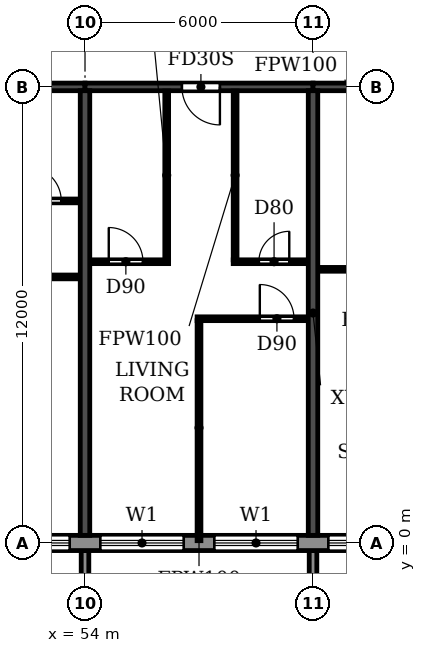
"""IFC4 building model, lengths in metres.
Left out: names, types, materials, properties, quantities, classifications, styles, units other than length and angle.
Written with IfcOpenShell. Run it as: python <this file> out.ifc"""

import sys

from ifc_helpers import new_model, si_unit, direction, frame, frame_2d, origin, place, context, subcontext, project, spatial, polyline, rectangle, outline, extrude, source, transform, mapped, element, fill, save


model = new_model("IFC4")
c1 = context("Model", 3, precision=1e-05, world=origin(), true_north=direction((0.0, 1.0)))
c2 = subcontext(c1, "Body", "Model", "MODEL_VIEW")
j1 = project(units=[si_unit("LENGTHUNIT", "METRE"), si_unit("PLANEANGLEUNIT", "RADIAN")], contexts=[c1])
p1 = place(None, origin())
s1 = spatial("IfcSite", under=j1, at=p1, CompositionType="ELEMENT")
p2 = place(p1, origin())
s2 = spatial("IfcBuilding", under=s1, at=p2, CompositionType="ELEMENT")
p3 = place(p2, frame((0.0, 0.0, 231.3)))
s3 = spatial("IfcBuildingStorey", under=s2, at=p3, CompositionType="ELEMENT", Elevation=231.3)
for number, where, z_axis, x_axis in (
    (1, (54.0, 0.2, 0.0), (0.0, 0.0, 1.0), (0.0, 1.0, 0.0)),
    (2, (60.0, 0.2, 0.0), (0.0, 0.0, 1.0), (0.0, 1.0, 0.0)),
):
    element("IfcWall", number, at=place(p3, frame(where, z_axis=z_axis, x_axis=x_axis)), inside=s3, PredefinedType="SHEAR", context=c2, shape_type="SweptSolid", body=[
        extrude(rectangle(XDim=11.7, YDim=0.25, at=frame_2d((5.85, 0.0))), origin(), (0.0, 0.0, 1.0), 3.08),
    ])
p4 = place(p3, frame((48.0, 12.0, 0.0), z_axis=(0.0, 0.0, 1.0), x_axis=(1.0, 0.0, 0.0)))
e3 = element("IfcWall", 3, at=p4, inside=s3, PredefinedType="SHEAR", context=c2, shape_type="SweptSolid", body=[
    extrude(rectangle(XDim=6.0, YDim=0.2, at=frame_2d((3.0, 0.0))), origin(), (0.0, 0.0, 1.0), 2.48),
])
p5 = place(p4, frame((2.45, 0.0, 0.0)))
e4 = element("IfcOpeningElement", 4, at=p5, cuts=e3, PredefinedType="OPENING", context=c2, shape_type="SweptSolid", body=[
    extrude(rectangle(XDim=1.0, YDim=2.1, at=frame_2d((0.5, 1.05))), frame((0.0, 0.11, 0.0), z_axis=(0.0, -1.0, 0.0), x_axis=(1.0, 0.0, 0.0)), (0.0, 0.0, 1.0), 0.22),
])
p6 = place(p3, frame((54.0, 12.0, 0.0), z_axis=(0.0, 0.0, 1.0), x_axis=(1.0, 0.0, 0.0)))
e5 = element("IfcWall", 5, at=p6, inside=s3, PredefinedType="SHEAR", context=c2, shape_type="SweptSolid", body=[
    extrude(rectangle(XDim=6.0, YDim=0.2, at=frame_2d((3.0, 0.0))), origin(), (0.0, 0.0, 1.0), 2.48),
])
p7 = place(p6, frame((2.55, 0.0, 0.0)))
e6 = element("IfcOpeningElement", 6, at=p7, cuts=e5, PredefinedType="OPENING", context=c2, shape_type="SweptSolid", body=[
    extrude(rectangle(XDim=1.0, YDim=2.1, at=frame_2d((0.5, 1.05))), frame((0.0, 0.11, 0.0), z_axis=(0.0, -1.0, 0.0), x_axis=(1.0, 0.0, 0.0)), (0.0, 0.0, 1.0), 0.22),
])
p8 = place(p3, frame((60.0, 12.0, 0.0), z_axis=(0.0, 0.0, 1.0), x_axis=(1.0, 0.0, 0.0)))
e7 = element("IfcWall", 7, at=p8, inside=s3, PredefinedType="SHEAR", context=c2, shape_type="SweptSolid", body=[
    extrude(rectangle(XDim=6.0, YDim=0.2, at=frame_2d((3.0, 0.0))), origin(), (0.0, 0.0, 1.0), 2.48),
])
p9 = place(p8, frame((2.45, 0.0, 0.0)))
e8 = element("IfcOpeningElement", 8, at=p9, cuts=e7, PredefinedType="OPENING", context=c2, shape_type="SweptSolid", body=[
    extrude(rectangle(XDim=1.0, YDim=2.1, at=frame_2d((0.5, 1.05))), frame((0.0, 0.11, 0.0), z_axis=(0.0, -1.0, 0.0), x_axis=(1.0, 0.0, 0.0)), (0.0, 0.0, 1.0), 0.22),
])
p10 = place(p3, frame((22.683, 0.0, 0.0), z_axis=(0.0, 0.0, 1.0), x_axis=(1.0, 0.0, 0.0)))
e9 = element("IfcWall", 9, at=p10, inside=s3, PredefinedType="STANDARD", context=c2, shape_type="SweptSolid", body=[
    extrude(rectangle(XDim=56.634, YDim=0.4, at=frame_2d((28.317, 0.0))), origin(), (0.0, 0.0, 1.0), 3.08),
])
p11 = place(p10, frame((1.917, 0.0, 0.0)))
e10 = element("IfcOpeningElement", 10, at=p11, cuts=e9, PredefinedType="OPENING", context=c2, shape_type="SweptSolid", body=[
    extrude(rectangle(XDim=1.8, YDim=2.4, at=frame_2d((0.9, 1.2))), frame((0.0, 0.21, 0.0), z_axis=(0.0, -1.0, 0.0), x_axis=(1.0, 0.0, 0.0)), (0.0, 0.0, 1.0), 0.42),
])
p12 = place(p10, frame((4.717, 0.0, 0.9)))
e11 = element("IfcOpeningElement", 11, at=p12, cuts=e9, PredefinedType="OPENING", context=c2, shape_type="SweptSolid", body=[
    extrude(rectangle(XDim=2.2, YDim=1.5, at=frame_2d((1.1, 0.75))), frame((0.0, 0.21, 0.0), z_axis=(0.0, -1.0, 0.0), x_axis=(1.0, 0.0, 0.0)), (0.0, 0.0, 1.0), 0.42),
])
p13 = place(p10, frame((7.717, 0.0, 0.9)))
e12 = element("IfcOpeningElement", 12, at=p13, cuts=e9, PredefinedType="OPENING", context=c2, shape_type="SweptSolid", body=[
    extrude(rectangle(XDim=2.2, YDim=1.5, at=frame_2d((1.1, 0.75))), frame((0.0, 0.21, 0.0), z_axis=(0.0, -1.0, 0.0), x_axis=(1.0, 0.0, 0.0)), (0.0, 0.0, 1.0), 0.42),
])
p14 = place(p10, frame((10.717, 0.0, 0.9)))
e13 = element("IfcOpeningElement", 13, at=p14, cuts=e9, PredefinedType="OPENING", context=c2, shape_type="SweptSolid", body=[
    extrude(rectangle(XDim=2.2, YDim=1.5, at=frame_2d((1.1, 0.75))), frame((0.0, 0.21, 0.0), z_axis=(0.0, -1.0, 0.0), x_axis=(1.0, 0.0, 0.0)), (0.0, 0.0, 1.0), 0.42),
])
p15 = place(p10, frame((13.717, 0.0, 0.9)))
e14 = element("IfcOpeningElement", 14, at=p15, cuts=e9, PredefinedType="OPENING", context=c2, shape_type="SweptSolid", body=[
    extrude(rectangle(XDim=2.2, YDim=1.5, at=frame_2d((1.1, 0.75))), frame((0.0, 0.21, 0.0), z_axis=(0.0, -1.0, 0.0), x_axis=(1.0, 0.0, 0.0)), (0.0, 0.0, 1.0), 0.42),
])
p16 = place(p10, frame((16.917, 0.0, 0.0)))
e15 = element("IfcOpeningElement", 15, at=p16, cuts=e9, PredefinedType="OPENING", context=c2, shape_type="SweptSolid", body=[
    extrude(rectangle(XDim=1.8, YDim=2.4, at=frame_2d((0.9, 1.2))), frame((0.0, 0.21, 0.0), z_axis=(0.0, -1.0, 0.0), x_axis=(1.0, 0.0, 0.0)), (0.0, 0.0, 1.0), 0.42),
])
p17 = place(p10, frame((19.717, 0.0, 0.9)))
e16 = element("IfcOpeningElement", 16, at=p17, cuts=e9, PredefinedType="OPENING", context=c2, shape_type="SweptSolid", body=[
    extrude(rectangle(XDim=2.2, YDim=1.5, at=frame_2d((1.1, 0.75))), frame((0.0, 0.21, 0.0), z_axis=(0.0, -1.0, 0.0), x_axis=(1.0, 0.0, 0.0)), (0.0, 0.0, 1.0), 0.42),
])
p18 = place(p10, frame((22.717, 0.0, 0.9)))
e17 = element("IfcOpeningElement", 17, at=p18, cuts=e9, PredefinedType="OPENING", context=c2, shape_type="SweptSolid", body=[
    extrude(rectangle(XDim=2.2, YDim=1.5, at=frame_2d((1.1, 0.75))), frame((0.0, 0.21, 0.0), z_axis=(0.0, -1.0, 0.0), x_axis=(1.0, 0.0, 0.0)), (0.0, 0.0, 1.0), 0.42),
])
p19 = place(p10, frame((25.917, 0.0, 0.0)))
e18 = element("IfcOpeningElement", 18, at=p19, cuts=e9, PredefinedType="OPENING", context=c2, shape_type="SweptSolid", body=[
    extrude(rectangle(XDim=1.8, YDim=2.4, at=frame_2d((0.9, 1.2))), frame((0.0, 0.21, 0.0), z_axis=(0.0, -1.0, 0.0), x_axis=(1.0, 0.0, 0.0)), (0.0, 0.0, 1.0), 0.42),
])
p20 = place(p10, frame((28.717, 0.0, 0.9)))
e19 = element("IfcOpeningElement", 19, at=p20, cuts=e9, PredefinedType="OPENING", context=c2, shape_type="SweptSolid", body=[
    extrude(rectangle(XDim=2.2, YDim=1.5, at=frame_2d((1.1, 0.75))), frame((0.0, 0.21, 0.0), z_axis=(0.0, -1.0, 0.0), x_axis=(1.0, 0.0, 0.0)), (0.0, 0.0, 1.0), 0.42),
])
p21 = place(p10, frame((31.717, 0.0, 0.9)))
e20 = element("IfcOpeningElement", 20, at=p21, cuts=e9, PredefinedType="OPENING", context=c2, shape_type="SweptSolid", body=[
    extrude(rectangle(XDim=2.2, YDim=1.5, at=frame_2d((1.1, 0.75))), frame((0.0, 0.21, 0.0), z_axis=(0.0, -1.0, 0.0), x_axis=(1.0, 0.0, 0.0)), (0.0, 0.0, 1.0), 0.42),
])
p22 = place(p10, frame((34.717, 0.0, 0.9)))
e21 = element("IfcOpeningElement", 21, at=p22, cuts=e9, PredefinedType="OPENING", context=c2, shape_type="SweptSolid", body=[
    extrude(rectangle(XDim=2.2, YDim=1.5, at=frame_2d((1.1, 0.75))), frame((0.0, 0.21, 0.0), z_axis=(0.0, -1.0, 0.0), x_axis=(1.0, 0.0, 0.0)), (0.0, 0.0, 1.0), 0.42),
])
p23 = place(p10, frame((37.717, 0.0, 0.9)))
e22 = element("IfcOpeningElement", 22, at=p23, cuts=e9, PredefinedType="OPENING", context=c2, shape_type="SweptSolid", body=[
    extrude(rectangle(XDim=2.2, YDim=1.5, at=frame_2d((1.1, 0.75))), frame((0.0, 0.21, 0.0), z_axis=(0.0, -1.0, 0.0), x_axis=(1.0, 0.0, 0.0)), (0.0, 0.0, 1.0), 0.42),
])
p24 = place(p10, frame((40.917, 0.0, 0.0)))
e23 = element("IfcOpeningElement", 23, at=p24, cuts=e9, PredefinedType="OPENING", context=c2, shape_type="SweptSolid", body=[
    extrude(rectangle(XDim=1.8, YDim=2.4, at=frame_2d((0.9, 1.2))), frame((0.0, 0.21, 0.0), z_axis=(0.0, -1.0, 0.0), x_axis=(1.0, 0.0, 0.0)), (0.0, 0.0, 1.0), 0.42),
])
p25 = place(p10, frame((43.717, 0.0, 0.9)))
e24 = element("IfcOpeningElement", 24, at=p25, cuts=e9, PredefinedType="OPENING", context=c2, shape_type="SweptSolid", body=[
    extrude(rectangle(XDim=2.2, YDim=1.5, at=frame_2d((1.1, 0.75))), frame((0.0, 0.21, 0.0), z_axis=(0.0, -1.0, 0.0), x_axis=(1.0, 0.0, 0.0)), (0.0, 0.0, 1.0), 0.42),
])
p26 = place(p10, frame((46.717, 0.0, 0.9)))
e25 = element("IfcOpeningElement", 25, at=p26, cuts=e9, PredefinedType="OPENING", context=c2, shape_type="SweptSolid", body=[
    extrude(rectangle(XDim=2.2, YDim=1.5, at=frame_2d((1.1, 0.75))), frame((0.0, 0.21, 0.0), z_axis=(0.0, -1.0, 0.0), x_axis=(1.0, 0.0, 0.0)), (0.0, 0.0, 1.0), 0.42),
])
p27 = place(p10, frame((49.717, 0.0, 0.9)))
e26 = element("IfcOpeningElement", 26, at=p27, cuts=e9, PredefinedType="OPENING", context=c2, shape_type="SweptSolid", body=[
    extrude(rectangle(XDim=2.2, YDim=1.5, at=frame_2d((1.1, 0.75))), frame((0.0, 0.21, 0.0), z_axis=(0.0, -1.0, 0.0), x_axis=(1.0, 0.0, 0.0)), (0.0, 0.0, 1.0), 0.42),
])
p28 = place(p10, frame((52.717, 0.0, 0.9)))
e27 = element("IfcOpeningElement", 27, at=p28, cuts=e9, PredefinedType="OPENING", context=c2, shape_type="SweptSolid", body=[
    extrude(rectangle(XDim=2.2, YDim=1.5, at=frame_2d((1.1, 0.75))), frame((0.0, 0.21, 0.0), z_axis=(0.0, -1.0, 0.0), x_axis=(1.0, 0.0, 0.0)), (0.0, 0.0, 1.0), 0.42),
])
m1 = source(origin(), c2, "Body", "SweptSolid", [
    extrude(outline(polyline([(0.0, 0.0), (0.2, 0.0), (0.2, 1.65), (0.0, 1.65), (0.0, 0.0)])), origin(), (0.0, 0.0, 1.0), 3.1),
])
for number, where in (
    (28, (53.9, -1.85, 0.0)),
    (29, (59.9, -1.85, 0.0)),
):
    element("IfcWall", number, at=place(p3, frame(where)), inside=s3, PredefinedType="STANDARD", context=c2, shape_type="MappedRepresentation", body=[
        mapped(m1, transform((0.0, 0.0, 0.0))),
    ])
p29 = place(p3, frame((56.95, 5.9, 0.0), z_axis=(0.0, 0.0, 1.0), x_axis=(1.0, 0.0, 0.0)))
e30 = element("IfcWall", 30, at=p29, inside=s3, PredefinedType="PARTITIONING", context=c2, shape_type="SweptSolid", body=[
    extrude(rectangle(XDim=2.915, YDim=0.1, at=frame_2d((1.458, 0.0))), origin(), (0.0, 0.0, 1.0), 3.08),
])
p30 = place(p29, frame((1.65, 0.0, 0.0)))
e31 = element("IfcOpeningElement", 31, at=p30, cuts=e30, PredefinedType="OPENING", context=c2, shape_type="SweptSolid", body=[
    extrude(rectangle(XDim=0.9, YDim=2.1, at=frame_2d((0.45, 1.05))), frame((0.0, 0.06, 0.0), z_axis=(0.0, -1.0, 0.0), x_axis=(1.0, 0.0, 0.0)), (0.0, 0.0, 1.0), 0.12),
])
p31 = place(p3, frame((50.95, 7.0, 0.0), z_axis=(0.0, 0.0, 1.0), x_axis=(1.0, 0.0, 0.0)))
e32 = element("IfcWall", 32, at=p31, inside=s3, PredefinedType="PARTITIONING", context=c2, shape_type="SweptSolid", body=[
    extrude(rectangle(XDim=2.915, YDim=0.1, at=frame_2d((1.458, 0.0))), origin(), (0.0, 0.0, 1.0), 3.08),
])
p32 = place(p31, frame((0.55, 0.0, 0.0)))
e33 = element("IfcOpeningElement", 33, at=p32, cuts=e32, PredefinedType="OPENING", context=c2, shape_type="SweptSolid", body=[
    extrude(rectangle(XDim=0.9, YDim=2.1, at=frame_2d((0.45, 1.05))), frame((0.0, 0.06, 0.0), z_axis=(0.0, -1.0, 0.0), x_axis=(1.0, 0.0, 0.0)), (0.0, 0.0, 1.0), 0.12),
])
p33 = place(p3, frame((60.135, 7.2, 0.0), z_axis=(0.0, 0.0, 1.0), x_axis=(1.0, 0.0, 0.0)))
e34 = element("IfcWall", 34, at=p33, inside=s3, PredefinedType="PARTITIONING", context=c2, shape_type="SweptSolid", body=[
    extrude(rectangle(XDim=1.965, YDim=0.1, at=frame_2d((0.982, 0.0))), origin(), (0.0, 0.0, 1.0), 3.08),
])
p34 = place(p3, frame((54.135, 7.4, 0.0), z_axis=(0.0, 0.0, 1.0), x_axis=(1.0, 0.0, 0.0)))
e35 = element("IfcWall", 35, at=p34, inside=s3, PredefinedType="PARTITIONING", context=c2, shape_type="SweptSolid", body=[
    extrude(rectangle(XDim=2.065, YDim=0.1, at=frame_2d((1.032, 0.0))), origin(), (0.0, 0.0, 1.0), 3.08),
])
p35 = place(p34, frame((0.49, 0.0, 0.0)))
e36 = element("IfcOpeningElement", 36, at=p35, cuts=e35, PredefinedType="OPENING", context=c2, shape_type="SweptSolid", body=[
    extrude(rectangle(XDim=0.9, YDim=2.1, at=frame_2d((0.45, 1.05))), frame((0.0, 0.06, 0.0), z_axis=(0.0, -1.0, 0.0), x_axis=(1.0, 0.0, 0.0)), (0.0, 0.0, 1.0), 0.12),
])
p36 = place(p3, frame((57.9, 7.4, 0.0), z_axis=(0.0, 0.0, 1.0), x_axis=(1.0, 0.0, 0.0)))
e37 = element("IfcWall", 37, at=p36, inside=s3, PredefinedType="PARTITIONING", context=c2, shape_type="SweptSolid", body=[
    extrude(rectangle(XDim=1.965, YDim=0.1, at=frame_2d((0.982, 0.0))), origin(), (0.0, 0.0, 1.0), 3.08),
])
p37 = place(p36, frame((0.675, 0.0, 0.0)))
e38 = element("IfcOpeningElement", 38, at=p37, cuts=e37, PredefinedType="OPENING", context=c2, shape_type="SweptSolid", body=[
    extrude(rectangle(XDim=0.8, YDim=2.1, at=frame_2d((0.4, 1.05))), frame((0.0, 0.06, 0.0), z_axis=(0.0, -1.0, 0.0), x_axis=(1.0, 0.0, 0.0)), (0.0, 0.0, 1.0), 0.12),
])
p38 = place(p3, frame((51.8, 9.0, 0.0), z_axis=(0.0, 0.0, 1.0), x_axis=(1.0, 0.0, 0.0)))
e39 = element("IfcWall", 39, at=p38, inside=s3, PredefinedType="PARTITIONING", context=c2, shape_type="SweptSolid", body=[
    extrude(rectangle(XDim=2.065, YDim=0.1, at=frame_2d((1.032, 0.0))), origin(), (0.0, 0.0, 1.0), 3.08),
])
p39 = place(p38, frame((0.675, 0.0, 0.0)))
e40 = element("IfcOpeningElement", 40, at=p39, cuts=e39, PredefinedType="OPENING", context=c2, shape_type="SweptSolid", body=[
    extrude(rectangle(XDim=0.9, YDim=2.1, at=frame_2d((0.45, 1.05))), frame((0.0, 0.06, 0.0), z_axis=(0.0, -1.0, 0.0), x_axis=(1.0, 0.0, 0.0)), (0.0, 0.0, 1.0), 0.12),
])
p40 = place(p3, frame((56.15, 7.45, 0.0), z_axis=(0.0, 0.0, 1.0), x_axis=(0.0, 1.0, 0.0)))
e41 = element("IfcWall", 41, at=p40, inside=s3, PredefinedType="PARTITIONING", context=c2, shape_type="SweptSolid", body=[
    extrude(rectangle(XDim=4.44, YDim=0.1, at=frame_2d((2.22, 0.0))), origin(), (0.0, 0.0, 1.0), 3.08),
])
p41 = place(p3, frame((57.0, 0.06, 0.0), z_axis=(0.0, 0.0, 1.0), x_axis=(0.0, 1.0, 0.0)))
e42 = element("IfcWall", 42, at=p41, inside=s3, PredefinedType="PARTITIONING", context=c2, shape_type="SweptSolid", body=[
    extrude(rectangle(XDim=5.79, YDim=0.1, at=frame_2d((2.895, 0.0))), origin(), (0.0, 0.0, 1.0), 3.08),
])
p42 = place(p3, frame((57.95, 7.45, 0.0), z_axis=(0.0, 0.0, 1.0), x_axis=(0.0, 1.0, 0.0)))
e43 = element("IfcWall", 43, at=p42, inside=s3, PredefinedType="PARTITIONING", context=c2, shape_type="SweptSolid", body=[
    extrude(rectangle(XDim=4.44, YDim=0.1, at=frame_2d((2.22, 0.0))), origin(), (0.0, 0.0, 1.0), 3.08),
])
p43 = place(p20, origin())
e44 = element("IfcWindow", 44, at=p43, inside=s3, PartitioningType="DOUBLE_PANEL_HORIZONTAL", PredefinedType="WINDOW", context=c2, shape_type="SweptSolid", body=[
    extrude(rectangle(XDim=2.2, YDim=1.5, at=frame_2d((1.1, 0.75))), frame((0.0, 0.03, 0.0), z_axis=(0.0, -1.0, 0.0), x_axis=(1.0, 0.0, 0.0)), (0.0, 0.0, 1.0), 0.06),
])
fill(e19, e44)
p44 = place(p21, origin())
e45 = element("IfcWindow", 45, at=p44, inside=s3, PartitioningType="DOUBLE_PANEL_HORIZONTAL", PredefinedType="WINDOW", context=c2, shape_type="SweptSolid", body=[
    extrude(rectangle(XDim=2.2, YDim=1.5, at=frame_2d((1.1, 0.75))), frame((0.0, 0.03, 0.0), z_axis=(0.0, -1.0, 0.0), x_axis=(1.0, 0.0, 0.0)), (0.0, 0.0, 1.0), 0.06),
])
fill(e20, e45)
p45 = place(p22, origin())
e46 = element("IfcWindow", 46, at=p45, inside=s3, PartitioningType="DOUBLE_PANEL_HORIZONTAL", PredefinedType="WINDOW", context=c2, shape_type="SweptSolid", body=[
    extrude(rectangle(XDim=2.2, YDim=1.5, at=frame_2d((1.1, 0.75))), frame((0.0, 0.03, 0.0), z_axis=(0.0, -1.0, 0.0), x_axis=(1.0, 0.0, 0.0)), (0.0, 0.0, 1.0), 0.06),
])
fill(e21, e46)
p46 = place(p23, origin())
e47 = element("IfcWindow", 47, at=p46, inside=s3, PartitioningType="DOUBLE_PANEL_HORIZONTAL", PredefinedType="WINDOW", context=c2, shape_type="SweptSolid", body=[
    extrude(rectangle(XDim=2.2, YDim=1.5, at=frame_2d((1.1, 0.75))), frame((0.0, 0.03, 0.0), z_axis=(0.0, -1.0, 0.0), x_axis=(1.0, 0.0, 0.0)), (0.0, 0.0, 1.0), 0.06),
])
fill(e22, e47)
p47 = place(p39, origin())
e48 = element("IfcDoor", 48, at=p47, inside=s3, OperationType="SINGLE_SWING_LEFT", PredefinedType="DOOR", context=c2, shape_type="SweptSolid", body=[
    extrude(rectangle(XDim=0.9, YDim=2.1, at=frame_2d((0.45, 1.05))), frame((0.0, 0.025, 0.0), z_axis=(0.0, -1.0, 0.0), x_axis=(1.0, 0.0, 0.0)), (0.0, 0.0, 1.0), 0.05),
])
fill(e40, e48)
p48 = place(p35, origin())
e49 = element("IfcDoor", 49, at=p48, inside=s3, OperationType="SINGLE_SWING_LEFT", PredefinedType="DOOR", context=c2, shape_type="SweptSolid", body=[
    extrude(rectangle(XDim=0.9, YDim=2.1, at=frame_2d((0.45, 1.05))), frame((0.0, 0.025, 0.0), z_axis=(0.0, -1.0, 0.0), x_axis=(1.0, 0.0, 0.0)), (0.0, 0.0, 1.0), 0.05),
])
fill(e36, e49)
p49 = place(p7, frame((1.0, 0.0, 0.0), z_axis=(0.0, 0.0, 1.0), x_axis=(-1.0, 0.0, 0.0)))
e50 = element("IfcDoor", 50, at=p49, inside=s3, OperationType="SINGLE_SWING_LEFT", PredefinedType="DOOR", context=c2, shape_type="SweptSolid", body=[
    extrude(rectangle(XDim=1.0, YDim=2.1, at=frame_2d((0.5, 1.05))), frame((0.0, 0.025, 0.0), z_axis=(0.0, -1.0, 0.0), x_axis=(1.0, 0.0, 0.0)), (0.0, 0.0, 1.0), 0.05),
])
fill(e6, e50)
p50 = place(p37, origin())
e51 = element("IfcDoor", 51, at=p50, inside=s3, OperationType="SINGLE_SWING_RIGHT", PredefinedType="DOOR", context=c2, shape_type="SweptSolid", body=[
    extrude(rectangle(XDim=0.8, YDim=2.1, at=frame_2d((0.4, 1.05))), frame((0.0, 0.025, 0.0), z_axis=(0.0, -1.0, 0.0), x_axis=(1.0, 0.0, 0.0)), (0.0, 0.0, 1.0), 0.05),
])
fill(e38, e51)
p51 = place(p30, origin())
e52 = element("IfcDoor", 52, at=p51, inside=s3, OperationType="SINGLE_SWING_LEFT", PredefinedType="DOOR", context=c2, shape_type="SweptSolid", body=[
    extrude(rectangle(XDim=0.9, YDim=2.1, at=frame_2d((0.45, 1.05))), frame((0.0, 0.025, 0.0), z_axis=(0.0, -1.0, 0.0), x_axis=(1.0, 0.0, 0.0)), (0.0, 0.0, 1.0), 0.05),
])
fill(e31, e52)
save(model, sys.argv[1])
